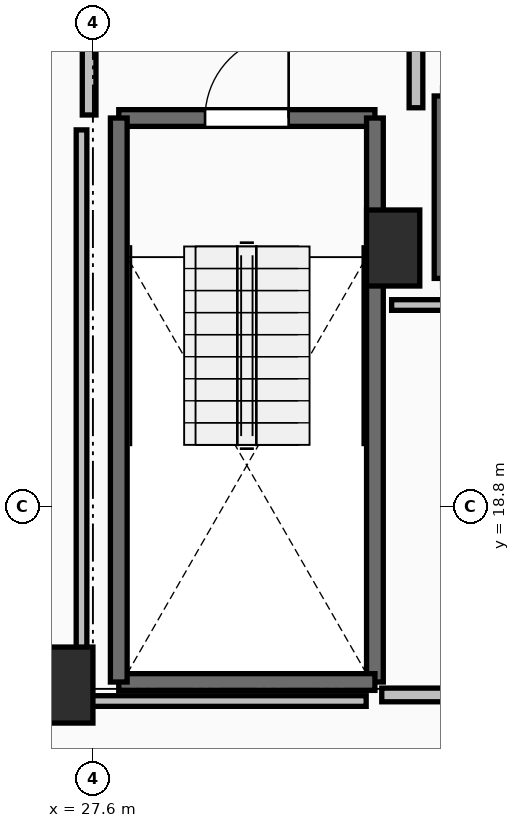
"""IFC4 building model, lengths in metres.
Left out: names, types, materials, properties, quantities, classifications, styles, units other than length and angle.
Written with IfcOpenShell. Run it as: python <this file> out.ifc"""

import sys

from ifc_helpers import new_model, si_unit, direction, frame, frame_2d, origin, origin_2d, place, context, subcontext, project, spatial, rectangle, extrude, element, fill, save


model = new_model("IFC4")
c1 = context("Model", 3, precision=1e-05, world=origin(), true_north=direction((0.0, 1.0)))
c2 = subcontext(c1, "Body", "Model", "MODEL_VIEW")
j1 = project(units=[si_unit("LENGTHUNIT", "METRE"), si_unit("PLANEANGLEUNIT", "RADIAN")], contexts=[c1])
p1 = place(None, origin())
s1 = spatial("IfcSite", under=j1, at=p1, CompositionType="ELEMENT")
p2 = place(p1, origin())
s2 = spatial("IfcBuilding", under=s1, at=p2, CompositionType="ELEMENT")
p3 = place(p2, frame((0.0, 0.0, 179.1)))
s3 = spatial("IfcBuildingStorey", under=s2, at=p3, CompositionType="ELEMENT", Elevation=179.1)
for number, where, z_axis, x_axis in (
    (1, (27.25, 16.45, 0.0), (0.0, 0.0, 1.0), (1.0, 0.0, 0.0)),
    (2, (31.55, 22.2, 0.0), (0.0, 0.0, 1.0), (1.0, 0.0, 0.0)),
):
    element("IfcColumn", number, at=place(p3, frame(where, z_axis=z_axis, x_axis=x_axis)), inside=s3, PredefinedType="PILASTER", context=c2, shape_type="SweptSolid", body=[
        extrude(rectangle(XDim=0.7, YDim=1.0, at=origin_2d()), origin(), (0.0, 0.0, 1.0), 3.5),
    ])
p4 = place(p3, frame((27.94, 23.91, 0.0), z_axis=(0.0, 0.0, 1.0), x_axis=(1.0, 0.0, 0.0)))
e3 = element("IfcWall", 3, at=p4, inside=s3, PredefinedType="SOLIDWALL", context=c2, shape_type="SweptSolid", body=[
    extrude(rectangle(XDim=3.37, YDim=0.22, at=frame_2d((1.685, 0.0))), origin(), (0.0, 0.0, 1.0), 3.24),
])
p5 = place(p4, frame((1.135, 0.0, 0.0)))
e4 = element("IfcOpeningElement", 4, at=p5, cuts=e3, PredefinedType="OPENING", context=c2, shape_type="SweptSolid", body=[
    extrude(rectangle(XDim=1.1, YDim=2.15, at=frame_2d((0.55, 1.075))), frame((0.0, 0.125, 0.0), z_axis=(0.0, -1.0, 0.0), x_axis=(1.0, 0.0, 0.0)), (0.0, 0.0, 1.0), 0.25),
])
p6 = place(p3, frame((31.31, 23.91, 0.0), z_axis=(0.0, 0.0, 1.0), x_axis=(0.0, -1.0, 0.0)))
e5 = element("IfcWall", 5, at=p6, inside=s3, PredefinedType="SOLIDWALL", context=c2, shape_type="SweptSolid", body=[
    extrude(rectangle(XDim=7.42, YDim=0.22, at=frame_2d((3.71, 0.0))), origin(), (0.0, 0.0, 1.0), 3.24),
])
p7 = place(p3, frame((31.31, 16.49, 0.0), z_axis=(0.0, 0.0, 1.0), x_axis=(-1.0, 0.0, 0.0)))
e6 = element("IfcWall", 6, at=p7, inside=s3, PredefinedType="SOLIDWALL", context=c2, shape_type="SweptSolid", body=[
    extrude(rectangle(XDim=3.37, YDim=0.22, at=frame_2d((1.685, 0.0))), origin(), (0.0, 0.0, 1.0), 3.24),
])
p8 = place(p3, frame((27.94, 16.49, 0.0), z_axis=(0.0, 0.0, 1.0), x_axis=(0.0, 1.0, 0.0)))
e7 = element("IfcWall", 7, at=p8, inside=s3, PredefinedType="SOLIDWALL", context=c2, shape_type="SweptSolid", body=[
    extrude(rectangle(XDim=7.42, YDim=0.22, at=frame_2d((3.71, 0.0))), origin(), (0.0, 0.0, 1.0), 3.24),
])
p9 = place(p3, frame((32.2, 24.2, 0.0), z_axis=(0.0, 0.0, 1.0), x_axis=(0.0, -1.0, 0.0)))
e8 = element("IfcWall", 8, at=p9, inside=s3, PredefinedType="SOLIDWALL", context=c2, shape_type="SweptSolid", body=[
    extrude(rectangle(XDim=2.4, YDim=0.22, at=frame_2d((1.2, 0.0))), origin(), (0.0, 0.0, 1.0), 3.24),
])
p10 = place(p3, frame((31.85, 24.045, 0.0), z_axis=(0.0, 0.0, 1.0), x_axis=(0.0, 1.0, 0.0)))
e9 = element("IfcWall", 9, at=p10, inside=s3, PredefinedType="PARTITIONING", context=c2, shape_type="SweptSolid", body=[
    extrude(rectangle(XDim=3.91, YDim=0.18, at=frame_2d((1.955, 0.0))), origin(), (0.0, 0.0, 1.0), 3.24),
])
p11 = place(p10, frame((1.355, 0.0, 0.0)))
e10 = element("IfcOpeningElement", 10, at=p11, cuts=e9, PredefinedType="OPENING", context=c2, shape_type="SweptSolid", body=[
    extrude(rectangle(XDim=1.2, YDim=2.15, at=frame_2d((0.6, 1.075))), frame((0.0, 0.105, 0.0), z_axis=(0.0, -1.0, 0.0), x_axis=(1.0, 0.0, 0.0)), (0.0, 0.0, 1.0), 0.21),
])
p12 = place(p3, frame((27.55, 28.0, 0.0), z_axis=(0.0, 0.0, 1.0), x_axis=(0.0, -1.0, 0.0)))
e11 = element("IfcWall", 11, at=p12, inside=s3, PredefinedType="PARTITIONING", context=c2, shape_type="SweptSolid", body=[
    extrude(rectangle(XDim=4.05, YDim=0.18, at=frame_2d((2.025, 0.0))), origin(), (0.0, 0.0, 1.0), 3.24),
])
p13 = place(p12, frame((1.425, 0.0, 0.0)))
e12 = element("IfcOpeningElement", 12, at=p13, cuts=e11, PredefinedType="OPENING", context=c2, shape_type="SweptSolid", body=[
    extrude(rectangle(XDim=1.2, YDim=2.15, at=frame_2d((0.6, 1.075))), frame((0.0, 0.105, 0.0), z_axis=(0.0, -1.0, 0.0), x_axis=(1.0, 0.0, 0.0)), (0.0, 0.0, 1.0), 0.21),
])
p14 = place(p3, frame((31.4, 16.32, 0.0), z_axis=(0.0, 0.0, 1.0), x_axis=(1.0, 0.0, 0.0)))
e13 = element("IfcWall", 13, at=p14, inside=s3, PredefinedType="PARTITIONING", context=c2, shape_type="SweptSolid", body=[
    extrude(rectangle(XDim=7.4, YDim=0.18, at=frame_2d((3.7, 0.0))), origin(), (0.0, 0.0, 1.0), 3.24),
])
p15 = place(p14, frame((3.275, 0.0, 0.0)))
e14 = element("IfcOpeningElement", 14, at=p15, cuts=e13, PredefinedType="OPENING", context=c2, shape_type="SweptSolid", body=[
    extrude(rectangle(XDim=0.85, YDim=2.1, at=frame_2d((0.425, 1.05))), frame((0.0, 0.105, 0.0), z_axis=(0.0, -1.0, 0.0), x_axis=(1.0, 0.0, 0.0)), (0.0, 0.0, 1.0), 0.21),
])
p16 = place(p3, frame((36.439, 21.45, 0.0), z_axis=(0.0, 0.0, 1.0), x_axis=(-1.0, 0.0, 0.0)))
e15 = element("IfcWall", 15, at=p16, inside=s3, PredefinedType="PARTITIONING", context=c2, shape_type="SweptSolid", body=[
    extrude(rectangle(XDim=4.909, YDim=0.14, at=frame_2d((2.455, 0.0))), origin(), (0.0, 0.0, 1.0), 3.24),
])
p17 = place(p3, frame((27.45, 23.754, 0.0), z_axis=(0.0, 0.0, 1.0), x_axis=(0.0, -1.0, 0.0)))
e16 = element("IfcWall", 16, at=p17, inside=s3, PredefinedType="PARTITIONING", context=c2, shape_type="SweptSolid", body=[
    extrude(rectangle(XDim=7.514, YDim=0.14, at=frame_2d((3.757, 0.0))), origin(), (0.0, 0.0, 1.0), 2.432),
])
p18 = place(p3, frame((27.45, 16.24, 0.0), z_axis=(0.0, 0.0, 1.0), x_axis=(1.0, 0.0, 0.0)))
e17 = element("IfcWall", 17, at=p18, inside=s3, PredefinedType="PARTITIONING", context=c2, shape_type="SweptSolid", body=[
    extrude(rectangle(XDim=3.745, YDim=0.14, at=frame_2d((1.873, 0.0))), origin(), (0.0, 0.0, 1.0), 2.432),
])
p19 = place(p5, origin())
e18 = element("IfcDoor", 18, at=p19, inside=s3, OperationType="SINGLE_SWING_RIGHT", PredefinedType="DOOR", context=c2, shape_type="SweptSolid", body=[
    extrude(rectangle(XDim=1.1, YDim=2.15, at=frame_2d((0.55, 1.075))), frame((0.0, 0.025, 0.0), z_axis=(0.0, -1.0, 0.0), x_axis=(1.0, 0.0, 0.0)), (0.0, 0.0, 1.0), 0.05),
])
fill(e4, e18)
save(model, sys.argv[1])
